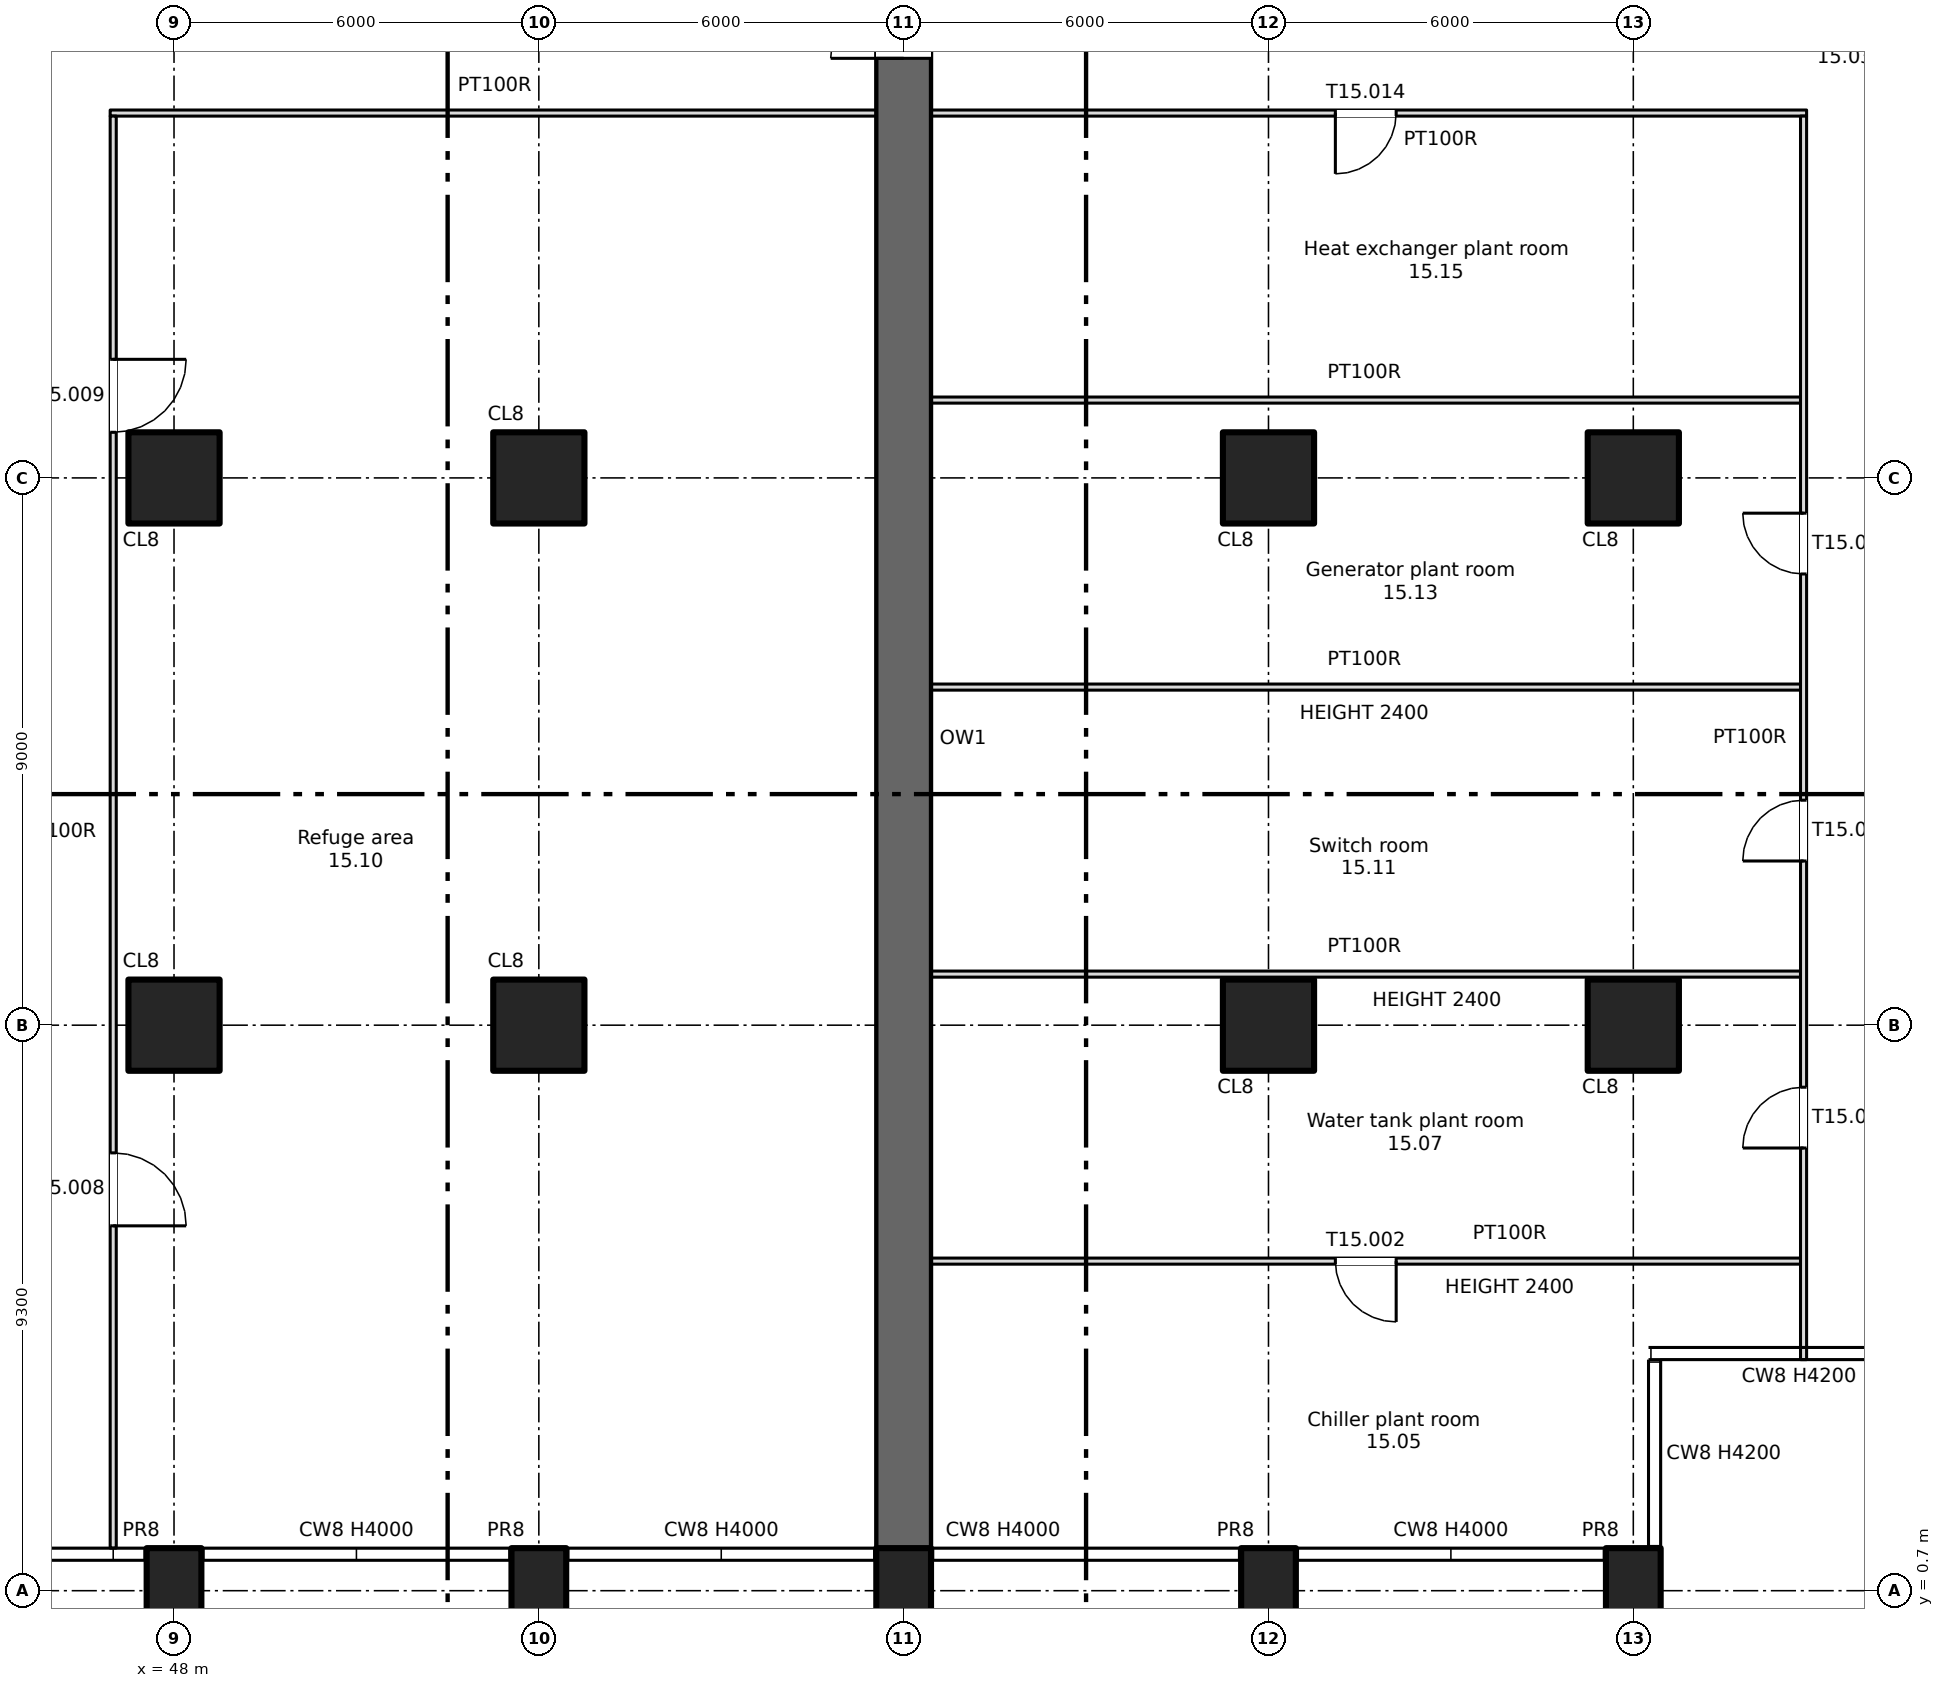
"""IFC4 building model, lengths in metres.
Left out: names, types, materials, properties, quantities, classifications, styles, units other than length and angle.
Written with IfcOpenShell. Run it as: python <this file> out.ifc"""

import sys

from ifc_helpers import new_model, si_unit, direction, frame, frame_2d, origin, origin_2d, place, context, subcontext, project, spatial, rectangle, extrude, element, fill, save


model = new_model("IFC4")
c1 = context("Model", 3, precision=1e-05, world=origin(), true_north=direction((0.0, 1.0)))
c2 = subcontext(c1, "Body", "Model", "MODEL_VIEW")
j1 = project(units=[si_unit("LENGTHUNIT", "METRE"), si_unit("PLANEANGLEUNIT", "RADIAN")], contexts=[c1])
p1 = place(None, origin())
s1 = spatial("IfcSite", under=j1, at=p1, CompositionType="ELEMENT")
p2 = place(p1, origin())
s2 = spatial("IfcBuilding", under=s1, at=p2, CompositionType="ELEMENT")
p3 = place(p2, frame((0.0, 0.0, 90.0)))
s3 = spatial("IfcBuildingStorey", under=s2, at=p3, CompositionType="ELEMENT", Elevation=90.0)
for number, where, z_axis, x_axis in (
    (1, (48.0, 0.7, -0.6), (0.0, 0.0, 1.0), (1.0, 0.0, 0.0)),
    (2, (54.0, 0.7, -0.6), (0.0, 0.0, 1.0), (1.0, 0.0, 0.0)),
    (3, (60.0, 0.7, -0.6), (0.0, 0.0, 1.0), (1.0, 0.0, 0.0)),
    (4, (66.0, 0.7, -0.6), (0.0, 0.0, 1.0), (1.0, 0.0, 0.0)),
    (5, (72.0, 0.7, -0.6), (0.0, 0.0, 1.0), (1.0, 0.0, 0.0)),
):
    element("IfcColumn", number, at=place(p3, frame(where, z_axis=z_axis, x_axis=x_axis)), inside=s3, PredefinedType="COLUMN", context=c2, shape_type="SweptSolid", body=[
        extrude(rectangle(XDim=0.9, YDim=1.4, at=origin_2d()), origin(), (0.0, 0.0, 1.0), 4.8),
    ])
for number, where, z_axis, x_axis in (
    (6, (48.0, 10.0, 0.0), (0.0, 0.0, 1.0), (1.0, 0.0, 0.0)),
    (7, (48.0, 19.0, 0.0), (0.0, 0.0, 1.0), (1.0, 0.0, 0.0)),
    (8, (54.0, 10.0, 0.0), (0.0, 0.0, 1.0), (1.0, 0.0, 0.0)),
    (9, (54.0, 19.0, 0.0), (0.0, 0.0, 1.0), (1.0, 0.0, 0.0)),
    (10, (66.0, 10.0, 0.0), (0.0, 0.0, 1.0), (1.0, 0.0, 0.0)),
    (11, (66.0, 19.0, 0.0), (0.0, 0.0, 1.0), (1.0, 0.0, 0.0)),
    (12, (72.0, 10.0, 0.0), (0.0, 0.0, 1.0), (1.0, 0.0, 0.0)),
    (13, (72.0, 19.0, 0.0), (0.0, 0.0, 1.0), (1.0, 0.0, 0.0)),
):
    element("IfcColumn", number, at=place(p3, frame(where, z_axis=z_axis, x_axis=x_axis)), inside=s3, PredefinedType="COLUMN", context=c2, shape_type="SweptSolid", body=[
        extrude(rectangle(XDim=1.5, YDim=1.5, at=origin_2d()), origin(), (0.0, 0.0, 1.0), 4.2),
    ])
p4 = place(p3, frame((60.0, 1.4, 0.0), z_axis=(0.0, 0.0, 1.0), x_axis=(0.0, 1.0, 0.0)))
e14 = element("IfcWall", 14, at=p4, inside=s3, PredefinedType="SHEAR", context=c2, shape_type="SweptSolid", body=[
    extrude(rectangle(XDim=26.6, YDim=0.9, at=frame_2d((13.3, 0.0))), origin(), (0.0, 0.0, 1.0), 4.2),
])
p5 = place(p4, frame((24.5, 0.0, 0.0)))
e15 = element("IfcOpeningElement", 15, at=p5, cuts=e14, PredefinedType="OPENING", context=c2, shape_type="SweptSolid", body=[
    extrude(rectangle(XDim=1.2, YDim=2.1, at=frame_2d((0.6, 1.05))), frame((0.0, 0.46, 0.0), z_axis=(0.0, -1.0, 0.0), x_axis=(1.0, 0.0, 0.0)), (0.0, 0.0, 1.0), 0.92),
])
p6 = place(p3, frame((60.4, 6.12, 0.0), z_axis=(0.0, 0.0, 1.0), x_axis=(1.0, 0.0, 0.0)))
e16 = element("IfcWall", 16, at=p6, inside=s3, PredefinedType="PARTITIONING", context=c2, shape_type="SweptSolid", body=[
    extrude(rectangle(XDim=14.35, YDim=0.1, at=frame_2d((7.175, 0.0))), origin(), (0.0, 0.0, 1.0), 2.4),
])
p7 = place(p6, frame((6.7, 0.0, 0.0)))
e17 = element("IfcOpeningElement", 17, at=p7, cuts=e16, PredefinedType="OPENING", context=c2, shape_type="SweptSolid", body=[
    extrude(rectangle(XDim=1.0, YDim=2.1, at=frame_2d((0.5, 1.05))), frame((0.0, 0.06, 0.0), z_axis=(0.0, -1.0, 0.0), x_axis=(1.0, 0.0, 0.0)), (0.0, 0.0, 1.0), 0.12),
])
for number, where, z_axis, x_axis in (
    (18, (60.4, 10.84, 0.0), (0.0, 0.0, 1.0), (1.0, 0.0, 0.0)),
    (19, (60.4, 15.56, 0.0), (0.0, 0.0, 1.0), (1.0, 0.0, 0.0)),
):
    element("IfcWall", number, at=place(p3, frame(where, z_axis=z_axis, x_axis=x_axis)), inside=s3, PredefinedType="PARTITIONING", context=c2, shape_type="SweptSolid", body=[
        extrude(rectangle(XDim=14.35, YDim=0.1, at=frame_2d((7.175, 0.0))), origin(), (0.0, 0.0, 1.0), 2.4),
    ])
p8 = place(p3, frame((60.4, 20.28, 0.0), z_axis=(0.0, 0.0, 1.0), x_axis=(1.0, 0.0, 0.0)))
e20 = element("IfcWall", 20, at=p8, inside=s3, PredefinedType="PARTITIONING", context=c2, shape_type="SweptSolid", body=[
    extrude(rectangle(XDim=14.35, YDim=0.1, at=frame_2d((7.175, 0.0))), origin(), (0.0, 0.0, 1.0), 4.2),
])
p9 = place(p3, frame((46.95, 25.0, 0.0), z_axis=(0.0, 0.0, 1.0), x_axis=(1.0, 0.0, 0.0)))
e21 = element("IfcWall", 21, at=p9, inside=s3, PredefinedType="PARTITIONING", context=c2, shape_type="SweptSolid", body=[
    extrude(rectangle(XDim=12.65, YDim=0.1, at=frame_2d((6.325, 0.0))), origin(), (0.0, 0.0, 1.0), 4.2),
])
p10 = place(p3, frame((60.4, 25.0, 0.0), z_axis=(0.0, 0.0, 1.0), x_axis=(1.0, 0.0, 0.0)))
e22 = element("IfcWall", 22, at=p10, inside=s3, PredefinedType="PARTITIONING", context=c2, shape_type="SweptSolid", body=[
    extrude(rectangle(XDim=14.45, YDim=0.1, at=frame_2d((7.225, 0.0))), origin(), (0.0, 0.0, 1.0), 4.2),
])
p11 = place(p10, frame((6.7, 0.0, 0.0)))
e23 = element("IfcOpeningElement", 23, at=p11, cuts=e22, PredefinedType="OPENING", context=c2, shape_type="SweptSolid", body=[
    extrude(rectangle(XDim=1.0, YDim=2.1, at=frame_2d((0.5, 1.05))), frame((0.0, 0.06, 0.0), z_axis=(0.0, -1.0, 0.0), x_axis=(1.0, 0.0, 0.0)), (0.0, 0.0, 1.0), 0.12),
])
p12 = place(p3, frame((47.0, 1.4, 0.0), z_axis=(0.0, 0.0, 1.0), x_axis=(0.0, 1.0, 0.0)))
e24 = element("IfcWall", 24, at=p12, inside=s3, PredefinedType="PARTITIONING", context=c2, shape_type="SweptSolid", body=[
    extrude(rectangle(XDim=23.55, YDim=0.1, at=frame_2d((11.775, 0.0))), origin(), (0.0, 0.0, 1.0), 4.2),
])
p13 = place(p12, frame((5.3, 0.0, 0.0)))
e25 = element("IfcOpeningElement", 25, at=p13, cuts=e24, PredefinedType="OPENING", context=c2, shape_type="SweptSolid", body=[
    extrude(rectangle(XDim=1.2, YDim=2.1, at=frame_2d((0.6, 1.05))), frame((0.0, 0.06, 0.0), z_axis=(0.0, -1.0, 0.0), x_axis=(1.0, 0.0, 0.0)), (0.0, 0.0, 1.0), 0.12),
])
p14 = place(p12, frame((18.35, 0.0, 0.0)))
e26 = element("IfcOpeningElement", 26, at=p14, cuts=e24, PredefinedType="OPENING", context=c2, shape_type="SweptSolid", body=[
    extrude(rectangle(XDim=1.2, YDim=2.1, at=frame_2d((0.6, 1.05))), frame((0.0, 0.06, 0.0), z_axis=(0.0, -1.0, 0.0), x_axis=(1.0, 0.0, 0.0)), (0.0, 0.0, 1.0), 0.12),
])
p15 = place(p3, frame((74.8, 4.5, 0.0), z_axis=(0.0, 0.0, 1.0), x_axis=(0.0, 1.0, 0.0)))
e27 = element("IfcWall", 27, at=p15, inside=s3, PredefinedType="PARTITIONING", context=c2, shape_type="SweptSolid", body=[
    extrude(rectangle(XDim=20.45, YDim=0.1, at=frame_2d((10.225, 0.0))), origin(), (0.0, 0.0, 1.0), 4.2),
])
p16 = place(p15, frame((3.48, 0.0, 0.0)))
e28 = element("IfcOpeningElement", 28, at=p16, cuts=e27, PredefinedType="OPENING", context=c2, shape_type="SweptSolid", body=[
    extrude(rectangle(XDim=1.0, YDim=2.1, at=frame_2d((0.5, 1.05))), frame((0.0, 0.06, 0.0), z_axis=(0.0, -1.0, 0.0), x_axis=(1.0, 0.0, 0.0)), (0.0, 0.0, 1.0), 0.12),
])
p17 = place(p15, frame((8.2, 0.0, 0.0)))
e29 = element("IfcOpeningElement", 29, at=p17, cuts=e27, PredefinedType="OPENING", context=c2, shape_type="SweptSolid", body=[
    extrude(rectangle(XDim=1.0, YDim=2.1, at=frame_2d((0.5, 1.05))), frame((0.0, 0.06, 0.0), z_axis=(0.0, -1.0, 0.0), x_axis=(1.0, 0.0, 0.0)), (0.0, 0.0, 1.0), 0.12),
])
p18 = place(p15, frame((12.92, 0.0, 0.0)))
e30 = element("IfcOpeningElement", 30, at=p18, cuts=e27, PredefinedType="OPENING", context=c2, shape_type="SweptSolid", body=[
    extrude(rectangle(XDim=1.0, YDim=2.1, at=frame_2d((0.5, 1.05))), frame((0.0, 0.06, 0.0), z_axis=(0.0, -1.0, 0.0), x_axis=(1.0, 0.0, 0.0)), (0.0, 0.0, 1.0), 0.12),
])
p19 = place(p7, origin())
e31 = element("IfcDoor", 31, at=p19, inside=s3, OperationType="SINGLE_SWING_RIGHT", PredefinedType="DOOR", context=c2, shape_type="SweptSolid", body=[
    extrude(rectangle(XDim=1.0, YDim=2.1, at=frame_2d((0.5, 1.05))), frame((0.0, 0.025, 0.0), z_axis=(0.0, -1.0, 0.0), x_axis=(1.0, 0.0, 0.0)), (0.0, 0.0, 1.0), 0.05),
])
fill(e17, e31)
p20 = place(p16, origin())
e32 = element("IfcDoor", 32, at=p20, inside=s3, OperationType="SINGLE_SWING_LEFT", PredefinedType="DOOR", context=c2, shape_type="SweptSolid", body=[
    extrude(rectangle(XDim=1.0, YDim=2.1, at=frame_2d((0.5, 1.05))), frame((0.0, 0.025, 0.0), z_axis=(0.0, -1.0, 0.0), x_axis=(1.0, 0.0, 0.0)), (0.0, 0.0, 1.0), 0.05),
])
fill(e28, e32)
p21 = place(p13, origin())
e33 = element("IfcDoor", 33, at=p21, inside=s3, OperationType="SINGLE_SWING_LEFT", PredefinedType="DOOR", context=c2, shape_type="SweptSolid", body=[
    extrude(rectangle(XDim=1.2, YDim=2.1, at=frame_2d((0.6, 1.05))), frame((0.0, 0.025, 0.0), z_axis=(0.0, -1.0, 0.0), x_axis=(1.0, 0.0, 0.0)), (0.0, 0.0, 1.0), 0.05),
])
fill(e25, e33)
p22 = place(p14, origin())
e34 = element("IfcDoor", 34, at=p22, inside=s3, OperationType="SINGLE_SWING_RIGHT", PredefinedType="DOOR", context=c2, shape_type="SweptSolid", body=[
    extrude(rectangle(XDim=1.2, YDim=2.1, at=frame_2d((0.6, 1.05))), frame((0.0, 0.025, 0.0), z_axis=(0.0, -1.0, 0.0), x_axis=(1.0, 0.0, 0.0)), (0.0, 0.0, 1.0), 0.05),
])
fill(e26, e34)
p23 = place(p17, origin())
e35 = element("IfcDoor", 35, at=p23, inside=s3, OperationType="SINGLE_SWING_LEFT", PredefinedType="DOOR", context=c2, shape_type="SweptSolid", body=[
    extrude(rectangle(XDim=1.0, YDim=2.1, at=frame_2d((0.5, 1.05))), frame((0.0, 0.025, 0.0), z_axis=(0.0, -1.0, 0.0), x_axis=(1.0, 0.0, 0.0)), (0.0, 0.0, 1.0), 0.05),
])
fill(e29, e35)
p24 = place(p18, origin())
e36 = element("IfcDoor", 36, at=p24, inside=s3, OperationType="SINGLE_SWING_RIGHT", PredefinedType="DOOR", context=c2, shape_type="SweptSolid", body=[
    extrude(rectangle(XDim=1.0, YDim=2.1, at=frame_2d((0.5, 1.05))), frame((0.0, 0.025, 0.0), z_axis=(0.0, -1.0, 0.0), x_axis=(1.0, 0.0, 0.0)), (0.0, 0.0, 1.0), 0.05),
])
fill(e30, e36)
p25 = place(p11, origin())
e37 = element("IfcDoor", 37, at=p25, inside=s3, OperationType="SINGLE_SWING_LEFT", PredefinedType="DOOR", context=c2, shape_type="SweptSolid", body=[
    extrude(rectangle(XDim=1.0, YDim=2.1, at=frame_2d((0.5, 1.05))), frame((0.0, 0.025, 0.0), z_axis=(0.0, -1.0, 0.0), x_axis=(1.0, 0.0, 0.0)), (0.0, 0.0, 1.0), 0.05),
])
fill(e23, e37)
p26 = place(p5, origin())
e38 = element("IfcDoor", 38, at=p26, inside=s3, OperationType="SINGLE_SWING_LEFT", PredefinedType="DOOR", context=c2, shape_type="SweptSolid", body=[
    extrude(rectangle(XDim=1.2, YDim=2.1, at=frame_2d((0.6, 1.05))), frame((0.0, 0.025, 0.0), z_axis=(0.0, -1.0, 0.0), x_axis=(1.0, 0.0, 0.0)), (0.0, 0.0, 1.0), 0.05),
])
fill(e15, e38)
save(model, sys.argv[1])
